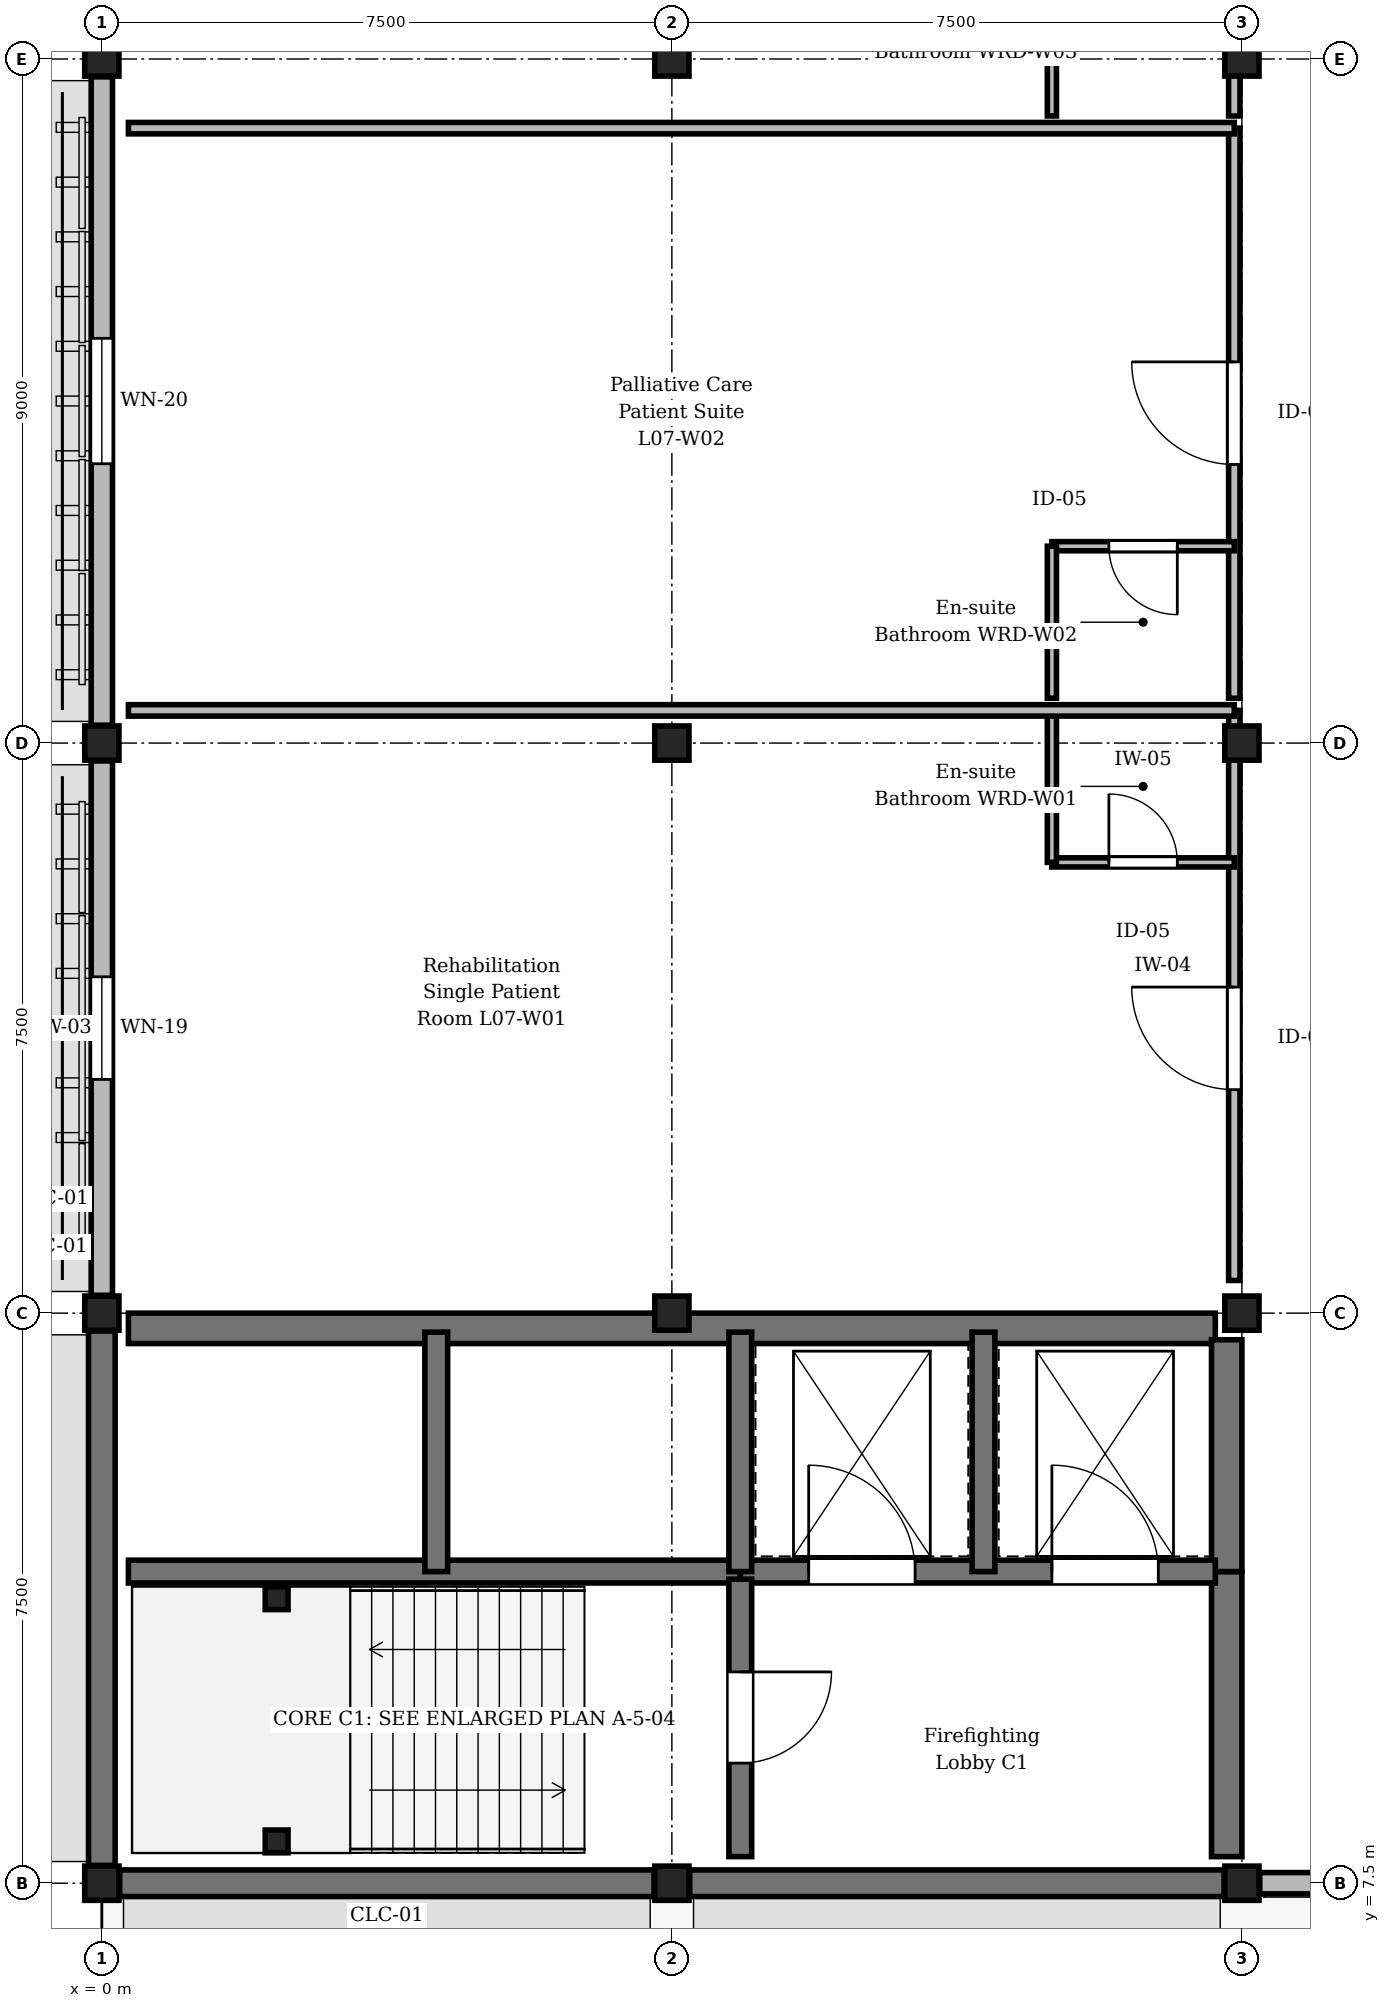
"""IFC4 building model, lengths in metres.
Left out: names, types, materials, properties, quantities, classifications, styles, units other than length and angle.
Written with IfcOpenShell. Run it as: python <this file> out.ifc"""

import sys

from ifc_helpers import new_model, si_unit, direction, frame, frame_2d, origin, origin_2d, place, context, subcontext, project, spatial, rectangle, i_section, extrude, element, fill, save


model = new_model("IFC4")
c1 = context("Model", 3, precision=1e-05, world=origin(), true_north=direction((0.0, 1.0)))
c2 = subcontext(c1, "Body", "Model", "MODEL_VIEW")
j1 = project(units=[si_unit("LENGTHUNIT", "METRE"), si_unit("PLANEANGLEUNIT", "RADIAN")], contexts=[c1])
p1 = place(None, origin())
s1 = spatial("IfcSite", under=j1, at=p1, CompositionType="ELEMENT")
p2 = place(p1, origin())
s2 = spatial("IfcBuilding", under=s1, at=p2, CompositionType="ELEMENT")
p3 = place(p2, frame((0.0, 0.0, 30.0)))
s3 = spatial("IfcBuildingStorey", under=s2, at=p3, CompositionType="ELEMENT", Elevation=30.0)
for number, where, z_axis, x_axis in (
    (1, (0.0, 7.5, 0.0), (0.0, 0.0, 1.0), (1.0, 0.0, 0.0)),
    (2, (0.0, 15.0, 0.0), (0.0, 0.0, 1.0), (1.0, 0.0, 0.0)),
    (3, (0.0, 22.5, 0.0), (0.0, 0.0, 1.0), (1.0, 0.0, 0.0)),
    (4, (0.0, 31.5, 0.0), (0.0, 0.0, 1.0), (1.0, 0.0, 0.0)),
    (5, (7.5, 7.5, 0.0), (0.0, 0.0, 1.0), (1.0, 0.0, 0.0)),
    (6, (7.5, 15.0, 0.0), (0.0, 0.0, 1.0), (1.0, 0.0, 0.0)),
    (7, (7.5, 22.5, 0.0), (0.0, 0.0, 1.0), (1.0, 0.0, 0.0)),
    (8, (7.5, 31.5, 0.0), (0.0, 0.0, 1.0), (1.0, 0.0, 0.0)),
    (9, (15.0, 7.5, 0.0), (0.0, 0.0, 1.0), (1.0, 0.0, 0.0)),
    (10, (15.0, 15.0, 0.0), (0.0, 0.0, 1.0), (1.0, 0.0, 0.0)),
    (11, (15.0, 22.5, 0.0), (0.0, 0.0, 1.0), (1.0, 0.0, 0.0)),
    (12, (15.0, 31.5, 0.0), (0.0, 0.0, 1.0), (1.0, 0.0, 0.0)),
):
    element("IfcColumn", number, at=place(p3, frame(where, z_axis=z_axis, x_axis=x_axis)), inside=s3, PredefinedType="COLUMN", context=c2, shape_type="SweptSolid", body=[
        extrude(rectangle(XDim=0.45, YDim=0.45, at=origin_2d()), origin(), (0.0, 0.0, 1.0), 4.05),
    ])
for number, where, z_axis, x_axis in (
    (13, (2.3, 8.05, 0.0), (0.0, 0.0, 1.0), (1.0, 0.0, 0.0)),
    (14, (2.3, 11.25, 0.0), (0.0, 0.0, 1.0), (1.0, 0.0, 0.0)),
):
    element("IfcColumn", number, at=place(p3, frame(where, z_axis=z_axis, x_axis=x_axis)), inside=s3, PredefinedType="COLUMN", context=c2, shape_type="SweptSolid", body=[
        extrude(i_section(OverallWidth=0.3, OverallDepth=0.3, WebThickness=0.011, FlangeThickness=0.019, FilletRadius=0.027, at=origin_2d()), origin(), (0.0, 0.0, 1.0), 4.05),
    ])
for number, where, z_axis, x_axis in (
    (15, (7.265, 7.5, 0.0), (0.0, 0.0, 1.0), (-1.0, 0.0, 0.0)),
    (16, (0.0, 7.735, 0.0), (0.0, 0.0, 1.0), (0.0, 1.0, 0.0)),
):
    element("IfcWall", number, at=place(p3, frame(where, z_axis=z_axis, x_axis=x_axis)), inside=s3, PredefinedType="SHEAR", context=c2, shape_type="SweptSolid", body=[
        extrude(rectangle(XDim=7.03, YDim=0.35, at=frame_2d((3.515, 0.0))), origin(), (0.0, 0.0, 1.0), 3.83),
    ])
p4 = place(p3, frame((0.0, 15.235, 0.0), z_axis=(0.0, 0.0, 1.0), x_axis=(0.0, 1.0, 0.0)))
e17 = element("IfcWall", 17, at=p4, inside=s3, PredefinedType="STANDARD", context=c2, shape_type="SweptSolid", body=[
    extrude(rectangle(XDim=7.03, YDim=0.28, at=frame_2d((3.515, 0.0))), origin(), (0.0, 0.0, 1.0), 3.83),
])
p5 = place(p4, frame((2.84, 0.0, 0.85)))
e18 = element("IfcOpeningElement", 18, at=p5, cuts=e17, PredefinedType="OPENING", context=c2, shape_type="SweptSolid", body=[
    extrude(rectangle(XDim=1.35, YDim=2.25, at=frame_2d((0.675, 1.125))), frame((0.0, 0.15, 0.0), z_axis=(0.0, -1.0, 0.0), x_axis=(1.0, 0.0, 0.0)), (0.0, 0.0, 1.0), 0.3),
])
p6 = place(p3, frame((0.0, 22.735, 0.0), z_axis=(0.0, 0.0, 1.0), x_axis=(0.0, 1.0, 0.0)))
e19 = element("IfcWall", 19, at=p6, inside=s3, PredefinedType="STANDARD", context=c2, shape_type="SweptSolid", body=[
    extrude(rectangle(XDim=8.53, YDim=0.28, at=frame_2d((4.265, 0.0))), origin(), (0.0, 0.0, 1.0), 3.83),
])
p7 = place(p6, frame((3.44, 0.0, 0.85)))
e20 = element("IfcOpeningElement", 20, at=p7, cuts=e19, PredefinedType="OPENING", context=c2, shape_type="SweptSolid", body=[
    extrude(rectangle(XDim=1.65, YDim=2.25, at=frame_2d((0.825, 1.125))), frame((0.0, 0.15, 0.0), z_axis=(0.0, -1.0, 0.0), x_axis=(1.0, 0.0, 0.0)), (0.0, 0.0, 1.0), 0.3),
])
p8 = place(p3, frame((14.765, 7.5, 0.0), z_axis=(0.0, 0.0, 1.0), x_axis=(-1.0, 0.0, 0.0)))
e21 = element("IfcWall", 21, at=p8, inside=s3, PredefinedType="SHEAR", context=c2, shape_type="SweptSolid", body=[
    extrude(rectangle(XDim=7.03, YDim=0.35, at=frame_2d((3.515, 0.0))), origin(), (0.0, 0.0, 1.0), 3.83),
])
p9 = place(p3, frame((22.265, 7.5, 0.0), z_axis=(0.0, 0.0, 1.0), x_axis=(-1.0, 0.0, 0.0)))
e22 = element("IfcWall", 22, at=p9, inside=s3, PredefinedType="STANDARD", context=c2, shape_type="SweptSolid", body=[
    extrude(rectangle(XDim=7.03, YDim=0.28, at=frame_2d((3.515, 0.0))), origin(), (0.0, 0.0, 1.0), 3.23),
])
p10 = place(p9, frame((2.915, 0.0, 0.0)))
e23 = element("IfcOpeningElement", 23, at=p10, cuts=e22, PredefinedType="OPENING", context=c2, shape_type="SweptSolid", body=[
    extrude(rectangle(XDim=1.2, YDim=2.3, at=frame_2d((0.6, 1.15))), frame((0.0, 0.15, 0.0), z_axis=(0.0, -1.0, 0.0), x_axis=(1.0, 0.0, 0.0)), (0.0, 0.0, 1.0), 0.3),
])
p11 = place(p3, frame((0.35, 14.8, 0.0), z_axis=(0.0, 0.0, 1.0), x_axis=(1.0, 0.0, 0.0)))
e24 = element("IfcWall", 24, at=p11, inside=s3, PredefinedType="SHEAR", context=c2, shape_type="SweptSolid", body=[
    extrude(rectangle(XDim=14.3, YDim=0.4, at=frame_2d((7.15, 0.0))), origin(), (0.0, 0.0, 1.0), 3.83),
])
p12 = place(p3, frame((14.8, 7.85, 0.0), z_axis=(0.0, 0.0, 1.0), x_axis=(0.0, 1.0, 0.0)))
e25 = element("IfcWall", 25, at=p12, inside=s3, PredefinedType="SHEAR", context=c2, shape_type="SweptSolid", body=[
    extrude(rectangle(XDim=3.75, YDim=0.4, at=frame_2d((1.875, 0.0))), origin(), (0.0, 0.0, 1.0), 3.83),
])
p13 = place(p3, frame((14.8, 11.6, 0.0), z_axis=(0.0, 0.0, 1.0), x_axis=(0.0, 1.0, 0.0)))
e26 = element("IfcWall", 26, at=p13, inside=s3, PredefinedType="SHEAR", context=c2, shape_type="SweptSolid", body=[
    extrude(rectangle(XDim=3.05, YDim=0.4, at=frame_2d((1.525, 0.0))), origin(), (0.0, 0.0, 1.0), 3.83),
])
p14 = place(p3, frame((0.35, 11.6, 0.0), z_axis=(0.0, 0.0, 1.0), x_axis=(1.0, 0.0, 0.0)))
e27 = element("IfcWall", 27, at=p14, inside=s3, PredefinedType="SHEAR", context=c2, shape_type="SweptSolid", body=[
    extrude(rectangle(XDim=8.05, YDim=0.3, at=frame_2d((4.025, 0.0))), origin(), (0.0, 0.0, 1.0), 3.83),
])
p15 = place(p3, frame((8.4, 11.6, 0.0), z_axis=(0.0, 0.0, 1.0), x_axis=(1.0, 0.0, 0.0)))
e28 = element("IfcWall", 28, at=p15, inside=s3, PredefinedType="SHEAR", context=c2, shape_type="SweptSolid", body=[
    extrude(rectangle(XDim=6.25, YDim=0.3, at=frame_2d((3.125, 0.0))), origin(), (0.0, 0.0, 1.0), 3.83),
])
p16 = place(p15, frame((0.9, 0.0, 0.0)))
e29 = element("IfcOpeningElement", 29, at=p16, cuts=e28, PredefinedType="OPENING", context=c2, shape_type="SweptSolid", body=[
    extrude(rectangle(XDim=1.4, YDim=2.25, at=frame_2d((0.7, 1.125))), frame((0.0, 0.16, 0.0), z_axis=(0.0, -1.0, 0.0), x_axis=(1.0, 0.0, 0.0)), (0.0, 0.0, 1.0), 0.32),
])
p17 = place(p15, frame((4.1, 0.0, 0.0)))
e30 = element("IfcOpeningElement", 30, at=p17, cuts=e28, PredefinedType="OPENING", context=c2, shape_type="SweptSolid", body=[
    extrude(rectangle(XDim=1.4, YDim=2.25, at=frame_2d((0.7, 1.125))), frame((0.0, 0.16, 0.0), z_axis=(0.0, -1.0, 0.0), x_axis=(1.0, 0.0, 0.0)), (0.0, 0.0, 1.0), 0.32),
])
p18 = place(p3, frame((8.4, 11.5, 0.0), z_axis=(0.0, 0.0, 1.0), x_axis=(0.0, -1.0, 0.0)))
e31 = element("IfcWall", 31, at=p18, inside=s3, PredefinedType="SHEAR", context=c2, shape_type="SweptSolid", body=[
    extrude(rectangle(XDim=3.65, YDim=0.3, at=frame_2d((1.825, 0.0))), origin(), (0.0, 0.0, 1.0), 3.83),
])
p19 = place(p18, frame((1.22, 0.0, 0.0)))
e32 = element("IfcOpeningElement", 32, at=p19, cuts=e31, PredefinedType="OPENING", context=c2, shape_type="SweptSolid", body=[
    extrude(rectangle(XDim=1.2, YDim=2.25, at=frame_2d((0.6, 1.125))), frame((0.0, 0.16, 0.0), z_axis=(0.0, -1.0, 0.0), x_axis=(1.0, 0.0, 0.0)), (0.0, 0.0, 1.0), 0.32),
])
for number, where, z_axis, x_axis in (
    (33, (4.4, 11.6, 0.0), (0.0, 0.0, 1.0), (0.0, 1.0, 0.0)),
    (34, (8.4, 11.6, 0.0), (0.0, 0.0, 1.0), (0.0, 1.0, 0.0)),
    (35, (11.6, 11.6, 0.0), (0.0, 0.0, 1.0), (0.0, 1.0, 0.0)),
):
    element("IfcWall", number, at=place(p3, frame(where, z_axis=z_axis, x_axis=x_axis)), inside=s3, PredefinedType="SHEAR", context=c2, shape_type="SweptSolid", body=[
        extrude(rectangle(XDim=3.15, YDim=0.3, at=frame_2d((1.575, 0.0))), origin(), (0.0, 0.0, 1.0), 3.83),
    ])
p20 = place(p3, frame((14.9, 15.43, 0.0), z_axis=(0.0, 0.0, 1.0), x_axis=(0.0, 1.0, 0.0)))
e36 = element("IfcWall", 36, at=p20, inside=s3, PredefinedType="PARTITIONING", context=c2, shape_type="SweptSolid", body=[
    extrude(rectangle(XDim=7.5, YDim=0.15, at=frame_2d((3.75, 0.0))), origin(), (0.0, 0.0, 1.0), 3.815),
])
p21 = place(p20, frame((2.51, 0.0, 0.0)))
e37 = element("IfcOpeningElement", 37, at=p21, cuts=e36, PredefinedType="OPENING", context=c2, shape_type="SweptSolid", body=[
    extrude(rectangle(XDim=1.35, YDim=2.25, at=frame_2d((0.675, 1.125))), frame((0.0, 0.085, 0.0), z_axis=(0.0, -1.0, 0.0), x_axis=(1.0, 0.0, 0.0)), (0.0, 0.0, 1.0), 0.17),
])
p22 = place(p3, frame((12.5, 20.93, 0.0), z_axis=(0.0, 0.0, 1.0), x_axis=(1.0, 0.0, 0.0)))
e38 = element("IfcWall", 38, at=p22, inside=s3, PredefinedType="PARTITIONING", context=c2, shape_type="SweptSolid", body=[
    extrude(rectangle(XDim=2.4, YDim=0.12, at=frame_2d((1.2, 0.0))), origin(), (0.0, 0.0, 1.0), 3.815),
])
p23 = place(p22, frame((0.75, 0.0, 0.0)))
e39 = element("IfcOpeningElement", 39, at=p23, cuts=e38, PredefinedType="OPENING", context=c2, shape_type="SweptSolid", body=[
    extrude(rectangle(XDim=0.9, YDim=2.1, at=frame_2d((0.45, 1.05))), frame((0.0, 0.07, 0.0), z_axis=(0.0, -1.0, 0.0), x_axis=(1.0, 0.0, 0.0)), (0.0, 0.0, 1.0), 0.14),
])
p24 = place(p3, frame((12.5, 20.93, 0.0), z_axis=(0.0, 0.0, 1.0), x_axis=(0.0, 1.0, 0.0)))
e40 = element("IfcWall", 40, at=p24, inside=s3, PredefinedType="PARTITIONING", context=c2, shape_type="SweptSolid", body=[
    extrude(rectangle(XDim=2.0, YDim=0.12, at=frame_2d((1.0, 0.0))), origin(), (0.0, 0.0, 1.0), 3.815),
])
p25 = place(p3, frame((14.9, 23.09, 0.0), z_axis=(0.0, 0.0, 1.0), x_axis=(0.0, 1.0, 0.0)))
e41 = element("IfcWall", 41, at=p25, inside=s3, PredefinedType="PARTITIONING", context=c2, shape_type="SweptSolid", body=[
    extrude(rectangle(XDim=7.5, YDim=0.15, at=frame_2d((3.75, 0.0))), origin(), (0.0, 0.0, 1.0), 3.815),
])
p26 = place(p25, frame((3.075, 0.0, 0.0)))
e42 = element("IfcOpeningElement", 42, at=p26, cuts=e41, PredefinedType="OPENING", context=c2, shape_type="SweptSolid", body=[
    extrude(rectangle(XDim=1.35, YDim=2.25, at=frame_2d((0.675, 1.125))), frame((0.0, 0.085, 0.0), z_axis=(0.0, -1.0, 0.0), x_axis=(1.0, 0.0, 0.0)), (0.0, 0.0, 1.0), 0.17),
])
p27 = place(p3, frame((14.9, 25.09, 0.0), z_axis=(0.0, 0.0, 1.0), x_axis=(-1.0, 0.0, 0.0)))
e43 = element("IfcWall", 43, at=p27, inside=s3, PredefinedType="PARTITIONING", context=c2, shape_type="SweptSolid", body=[
    extrude(rectangle(XDim=2.4, YDim=0.12, at=frame_2d((1.2, 0.0))), origin(), (0.0, 0.0, 1.0), 3.815),
])
p28 = place(p27, frame((0.75, 0.0, 0.0)))
e44 = element("IfcOpeningElement", 44, at=p28, cuts=e43, PredefinedType="OPENING", context=c2, shape_type="SweptSolid", body=[
    extrude(rectangle(XDim=0.9, YDim=2.1, at=frame_2d((0.45, 1.05))), frame((0.0, 0.07, 0.0), z_axis=(0.0, -1.0, 0.0), x_axis=(1.0, 0.0, 0.0)), (0.0, 0.0, 1.0), 0.14),
])
p29 = place(p3, frame((12.5, 23.09, 0.0), z_axis=(0.0, 0.0, 1.0), x_axis=(0.0, 1.0, 0.0)))
e45 = element("IfcWall", 45, at=p29, inside=s3, PredefinedType="PARTITIONING", context=c2, shape_type="SweptSolid", body=[
    extrude(rectangle(XDim=2.0, YDim=0.12, at=frame_2d((1.0, 0.0))), origin(), (0.0, 0.0, 1.0), 3.815),
])
p30 = place(p3, frame((14.9, 30.75, 0.0), z_axis=(0.0, 0.0, 1.0), x_axis=(0.0, 1.0, 0.0)))
e46 = element("IfcWall", 46, at=p30, inside=s3, PredefinedType="PARTITIONING", context=c2, shape_type="SweptSolid", body=[
    extrude(rectangle(XDim=7.5, YDim=0.15, at=frame_2d((3.75, 0.0))), origin(), (0.0, 0.0, 1.0), 3.815),
])
p31 = place(p30, frame((3.64, 0.0, 0.0)))
e47 = element("IfcOpeningElement", 47, at=p31, cuts=e46, PredefinedType="OPENING", context=c2, shape_type="SweptSolid", body=[
    extrude(rectangle(XDim=1.35, YDim=2.25, at=frame_2d((0.675, 1.125))), frame((0.0, 0.085, 0.0), z_axis=(0.0, -1.0, 0.0), x_axis=(1.0, 0.0, 0.0)), (0.0, 0.0, 1.0), 0.17),
])
p32 = place(p3, frame((12.5, 30.75, 0.0), z_axis=(0.0, 0.0, 1.0), x_axis=(0.0, 1.0, 0.0)))
e48 = element("IfcWall", 48, at=p32, inside=s3, PredefinedType="PARTITIONING", context=c2, shape_type="SweptSolid", body=[
    extrude(rectangle(XDim=2.0, YDim=0.12, at=frame_2d((1.0, 0.0))), origin(), (0.0, 0.0, 1.0), 3.815),
])
for number, where, z_axis, x_axis in (
    (49, (0.35, 22.93, 0.0), (0.0, 0.0, 1.0), (1.0, 0.0, 0.0)),
    (50, (0.35, 30.59, 0.0), (0.0, 0.0, 1.0), (1.0, 0.0, 0.0)),
):
    element("IfcWall", number, at=place(p3, frame(where, z_axis=z_axis, x_axis=x_axis)), inside=s3, PredefinedType="PARTITIONING", context=c2, shape_type="SweptSolid", body=[
        extrude(rectangle(XDim=14.55, YDim=0.15, at=frame_2d((7.275, 0.0))), origin(), (0.0, 0.0, 1.0), 3.815),
    ])
p33 = place(p5, origin())
e51 = element("IfcWindow", 51, at=p33, inside=s3, PartitioningType="SINGLE_PANEL", PredefinedType="WINDOW", context=c2, shape_type="SweptSolid", body=[
    extrude(rectangle(XDim=1.35, YDim=2.25, at=frame_2d((0.675, 1.125))), frame((0.0, 0.03, 0.0), z_axis=(0.0, -1.0, 0.0), x_axis=(1.0, 0.0, 0.0)), (0.0, 0.0, 1.0), 0.06),
])
fill(e18, e51)
p34 = place(p7, origin())
e52 = element("IfcWindow", 52, at=p34, inside=s3, PartitioningType="SINGLE_PANEL", PredefinedType="WINDOW", context=c2, shape_type="SweptSolid", body=[
    extrude(rectangle(XDim=1.65, YDim=2.25, at=frame_2d((0.825, 1.125))), frame((0.0, 0.03, 0.0), z_axis=(0.0, -1.0, 0.0), x_axis=(1.0, 0.0, 0.0)), (0.0, 0.0, 1.0), 0.06),
])
fill(e20, e52)
p35 = place(p16, origin())
e53 = element("IfcDoor", 53, at=p35, inside=s3, OperationType="DOUBLE_DOOR_SLIDING", PredefinedType="DOOR", context=c2, shape_type="SweptSolid", body=[
    extrude(rectangle(XDim=1.4, YDim=2.25, at=frame_2d((0.7, 1.125))), frame((0.0, 0.025, 0.0), z_axis=(0.0, -1.0, 0.0), x_axis=(1.0, 0.0, 0.0)), (0.0, 0.0, 1.0), 0.05),
])
fill(e29, e53)
p36 = place(p17, origin())
e54 = element("IfcDoor", 54, at=p36, inside=s3, OperationType="DOUBLE_DOOR_SLIDING", PredefinedType="DOOR", context=c2, shape_type="SweptSolid", body=[
    extrude(rectangle(XDim=1.4, YDim=2.25, at=frame_2d((0.7, 1.125))), frame((0.0, 0.025, 0.0), z_axis=(0.0, -1.0, 0.0), x_axis=(1.0, 0.0, 0.0)), (0.0, 0.0, 1.0), 0.05),
])
fill(e30, e54)
p37 = place(p19, origin())
e55 = element("IfcDoor", 55, at=p37, inside=s3, OperationType="SINGLE_SWING_LEFT", PredefinedType="DOOR", context=c2, shape_type="SweptSolid", body=[
    extrude(rectangle(XDim=1.2, YDim=2.25, at=frame_2d((0.6, 1.125))), frame((0.0, 0.025, 0.0), z_axis=(0.0, -1.0, 0.0), x_axis=(1.0, 0.0, 0.0)), (0.0, 0.0, 1.0), 0.05),
])
fill(e32, e55)
p38 = place(p21, origin())
e56 = element("IfcDoor", 56, at=p38, inside=s3, OperationType="SINGLE_SWING_RIGHT", PredefinedType="DOOR", context=c2, shape_type="SweptSolid", body=[
    extrude(rectangle(XDim=1.35, YDim=2.25, at=frame_2d((0.675, 1.125))), frame((0.0, 0.025, 0.0), z_axis=(0.0, -1.0, 0.0), x_axis=(1.0, 0.0, 0.0)), (0.0, 0.0, 1.0), 0.05),
])
fill(e37, e56)
p39 = place(p23, origin())
e57 = element("IfcDoor", 57, at=p39, inside=s3, OperationType="SINGLE_SWING_LEFT", PredefinedType="DOOR", context=c2, shape_type="SweptSolid", body=[
    extrude(rectangle(XDim=0.9, YDim=2.1, at=frame_2d((0.45, 1.05))), frame((0.0, 0.025, 0.0), z_axis=(0.0, -1.0, 0.0), x_axis=(1.0, 0.0, 0.0)), (0.0, 0.0, 1.0), 0.05),
])
fill(e39, e57)
p40 = place(p26, origin())
e58 = element("IfcDoor", 58, at=p40, inside=s3, OperationType="SINGLE_SWING_RIGHT", PredefinedType="DOOR", context=c2, shape_type="SweptSolid", body=[
    extrude(rectangle(XDim=1.35, YDim=2.25, at=frame_2d((0.675, 1.125))), frame((0.0, 0.025, 0.0), z_axis=(0.0, -1.0, 0.0), x_axis=(1.0, 0.0, 0.0)), (0.0, 0.0, 1.0), 0.05),
])
fill(e42, e58)
p41 = place(p28, origin())
e59 = element("IfcDoor", 59, at=p41, inside=s3, OperationType="SINGLE_SWING_LEFT", PredefinedType="DOOR", context=c2, shape_type="SweptSolid", body=[
    extrude(rectangle(XDim=0.9, YDim=2.1, at=frame_2d((0.45, 1.05))), frame((0.0, 0.025, 0.0), z_axis=(0.0, -1.0, 0.0), x_axis=(1.0, 0.0, 0.0)), (0.0, 0.0, 1.0), 0.05),
])
fill(e44, e59)
save(model, sys.argv[1])
